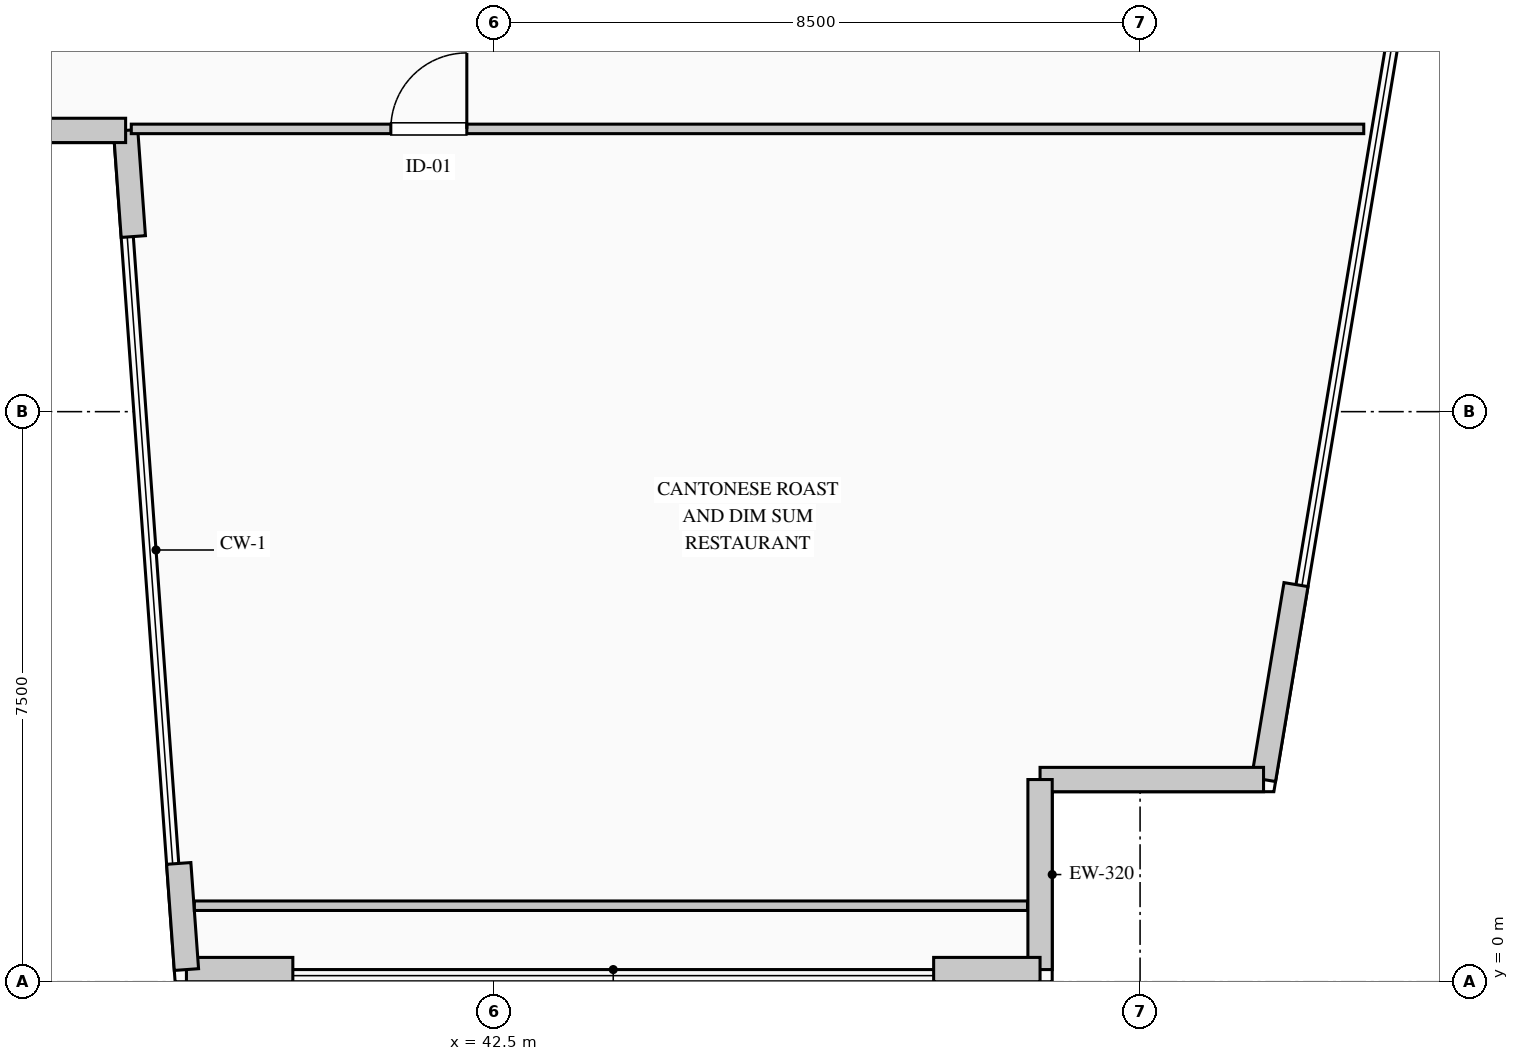
"""IFC4 building model, lengths in metres.
Left out: names, types, materials, properties, quantities, classifications, styles, units other than length and angle.
Written with IfcOpenShell. Run it as: python <this file> out.ifc"""

import sys

from ifc_helpers import new_model, si_unit, direction, frame, frame_2d, origin, place, context, subcontext, project, spatial, rectangle, extrude, element, fill, save


model = new_model("IFC4")
c1 = context("Model", 3, precision=1e-05, world=origin(), true_north=direction((0.0, 1.0)))
c2 = subcontext(c1, "Body", "Model", "MODEL_VIEW")
j1 = project(units=[si_unit("LENGTHUNIT", "METRE"), si_unit("PLANEANGLEUNIT", "RADIAN")], contexts=[c1])
p1 = place(None, origin())
s1 = spatial("IfcSite", under=j1, at=p1, CompositionType="ELEMENT")
p2 = place(p1, origin())
s2 = spatial("IfcBuilding", under=s1, at=p2, CompositionType="ELEMENT")
p3 = place(p2, frame((0.0, 0.0, 5.4)))
s3 = spatial("IfcBuildingStorey", under=s2, at=p3, CompositionType="ELEMENT", Elevation=5.4)
p4 = place(p3, frame((53.052, 5.225, 0.0), z_axis=(0.0, 0.0, 1.0), x_axis=(-0.164231487243, -0.986421825893, 0.0)))
e1 = element("IfcWall", 1, at=p4, inside=s3, PredefinedType="STANDARD", context=c2, shape_type="SweptSolid", body=[
    extrude(rectangle(XDim=2.6, YDim=0.32, at=frame_2d((1.3, 0.0))), origin(), (0.0, 0.0, 1.0), 5.08),
])
p5 = place(p3, frame((52.625, 2.66, 0.0), z_axis=(0.0, 0.0, 1.0), x_axis=(-1.0, 0.0, 0.0)))
e2 = element("IfcWall", 2, at=p5, inside=s3, PredefinedType="STANDARD", context=c2, shape_type="SweptSolid", body=[
    extrude(rectangle(XDim=2.94, YDim=0.32, at=frame_2d((1.47, 0.0))), origin(), (0.0, 0.0, 1.0), 5.08),
])
p6 = place(p3, frame((49.684, 2.66, 0.0), z_axis=(0.0, 0.0, 1.0), x_axis=(0.0, -1.0, 0.0)))
e3 = element("IfcWall", 3, at=p6, inside=s3, PredefinedType="STANDARD", context=c2, shape_type="SweptSolid", body=[
    extrude(rectangle(XDim=2.5, YDim=0.32, at=frame_2d((1.25, 0.0))), origin(), (0.0, 0.0, 1.0), 5.08),
])
p7 = place(p3, frame((49.684, 0.16, 0.0), z_axis=(0.0, 0.0, 1.0), x_axis=(-1.0, 0.0, 0.0)))
e4 = element("IfcWall", 4, at=p7, inside=s3, PredefinedType="STANDARD", context=c2, shape_type="SweptSolid", body=[
    extrude(rectangle(XDim=1.4, YDim=0.32, at=frame_2d((0.7, 0.0))), origin(), (0.0, 0.0, 1.0), 5.08),
])
p8 = place(p3, frame((39.853, 0.16, 0.0), z_axis=(0.0, 0.0, 1.0), x_axis=(-1.0, 0.0, 0.0)))
e5 = element("IfcWall", 5, at=p8, inside=s3, PredefinedType="STANDARD", context=c2, shape_type="SweptSolid", body=[
    extrude(rectangle(XDim=1.4, YDim=0.32, at=frame_2d((0.7, 0.0))), origin(), (0.0, 0.0, 1.0), 5.08),
])
p9 = place(p3, frame((38.453, 0.16, 0.0), z_axis=(0.0, 0.0, 1.0), x_axis=(-0.072362245244, 0.997378416381, 0.0)))
e6 = element("IfcWall", 6, at=p9, inside=s3, PredefinedType="STANDARD", context=c2, shape_type="SweptSolid", body=[
    extrude(rectangle(XDim=1.4, YDim=0.32, at=frame_2d((0.7, 0.0))), origin(), (0.0, 0.0, 1.0), 5.08),
])
p10 = place(p3, frame((37.754, 9.804, 0.0), z_axis=(0.0, 0.0, 1.0), x_axis=(-0.072201344972, 0.997390077043, 0.0)))
e7 = element("IfcWall", 7, at=p10, inside=s3, PredefinedType="STANDARD", context=c2, shape_type="SweptSolid", body=[
    extrude(rectangle(XDim=1.4, YDim=0.32, at=frame_2d((0.7, 0.0))), origin(), (0.0, 0.0, 1.0), 5.08),
])
p11 = place(p3, frame((37.653, 11.2, 0.0), z_axis=(0.0, 0.0, 1.0), x_axis=(-1.0, 0.0, 0.0)))
e8 = element("IfcWall", 8, at=p11, inside=s3, PredefinedType="STANDARD", context=c2, shape_type="SweptSolid", body=[
    extrude(rectangle(XDim=1.4, YDim=0.32, at=frame_2d((0.7, 0.0))), origin(), (0.0, 0.0, 1.0), 5.08),
])
p12 = place(p3, frame((49.519, 1.0, 0.0), z_axis=(0.0, 0.0, 1.0), x_axis=(-1.0, 0.0, 0.0)))
e9 = element("IfcWall", 9, at=p12, inside=s3, PredefinedType="PARTITIONING", context=c2, shape_type="SweptSolid", body=[
    extrude(rectangle(XDim=10.962, YDim=0.125, at=frame_2d((5.481, 0.0))), origin(), (0.0, 0.0, 1.0), 5.08),
])
p13 = place(p3, frame((37.727, 11.22, 0.0), z_axis=(0.0, 0.0, 1.0), x_axis=(1.0, 0.0, 0.0)))
e10 = element("IfcWall", 10, at=p13, inside=s3, PredefinedType="PARTITIONING", context=c2, shape_type="SweptSolid", body=[
    extrude(rectangle(XDim=16.216, YDim=0.125, at=frame_2d((8.108, 0.0))), origin(), (0.0, 0.0, 1.0), 5.08),
])
p14 = place(p13, frame((3.415, 0.0, 0.0)))
e11 = element("IfcOpeningElement", 11, at=p14, cuts=e10, PredefinedType="OPENING", context=c2, shape_type="SweptSolid", body=[
    extrude(rectangle(XDim=1.0, YDim=2.15, at=frame_2d((0.5, 1.075))), frame((0.0, 0.073, 0.0), z_axis=(0.0, -1.0, 0.0), x_axis=(1.0, 0.0, 0.0)), (0.0, 0.0, 1.0), 0.145),
])
p15 = place(p14, origin())
e12 = element("IfcDoor", 12, at=p15, inside=s3, OperationType="SINGLE_SWING_RIGHT", PredefinedType="DOOR", context=c2, shape_type="SweptSolid", body=[
    extrude(rectangle(XDim=1.0, YDim=2.15, at=frame_2d((0.5, 1.075))), frame((0.0, 0.025, 0.0), z_axis=(0.0, -1.0, 0.0), x_axis=(1.0, 0.0, 0.0)), (0.0, 0.0, 1.0), 0.05),
])
fill(e11, e12)
save(model, sys.argv[1])
